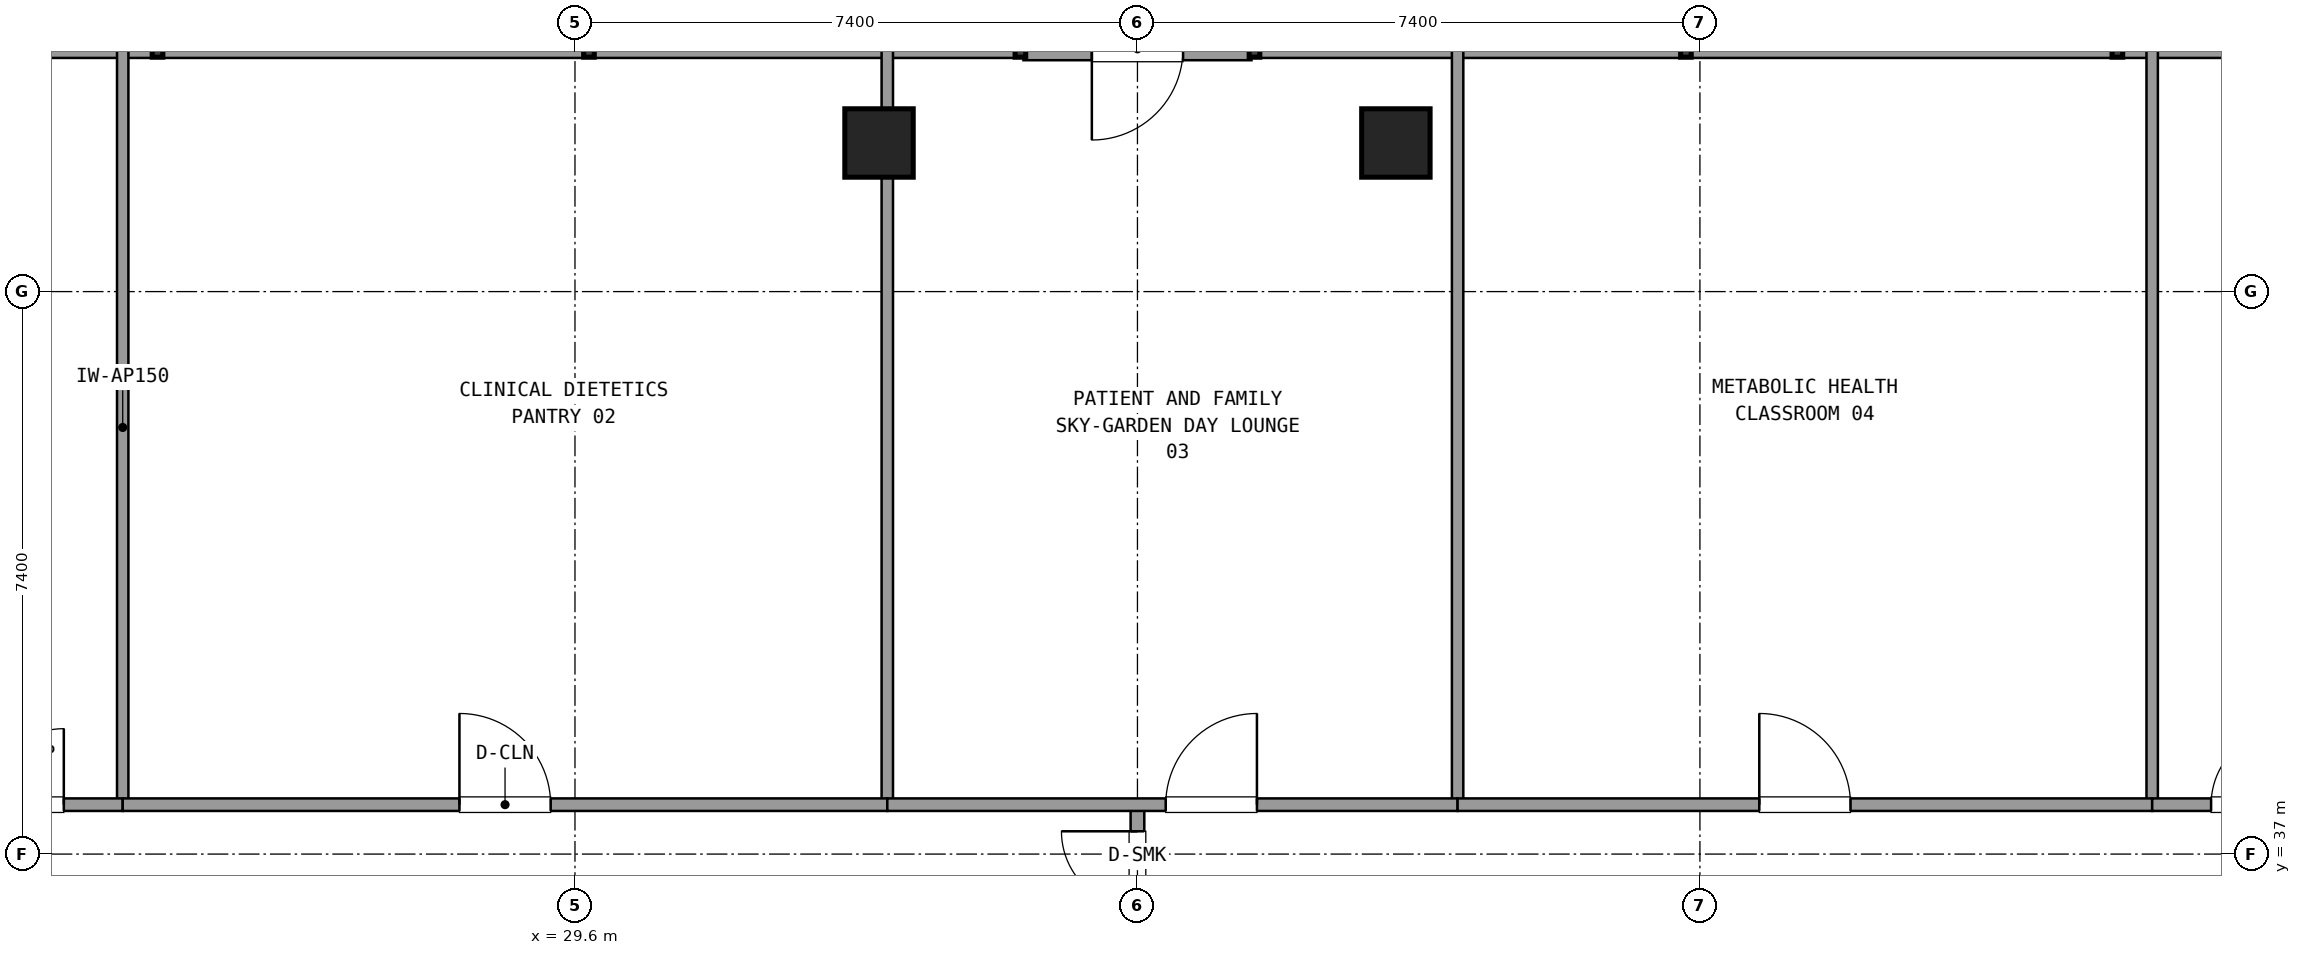
"""IFC4 building model, lengths in metres.
Left out: names, types, materials, properties, quantities, classifications, styles, units other than length and angle.
Written with IfcOpenShell. Run it as: python <this file> out.ifc"""

import sys

from ifc_helpers import new_model, si_unit, direction, frame, frame_2d, origin, origin_2d, place, context, subcontext, project, spatial, rectangle, extrude, element, fill, save


model = new_model("IFC4")
c1 = context("Model", 3, precision=1e-05, world=origin(), true_north=direction((0.0, 1.0)))
c2 = subcontext(c1, "Body", "Model", "MODEL_VIEW")
j1 = project(units=[si_unit("LENGTHUNIT", "METRE"), si_unit("PLANEANGLEUNIT", "RADIAN")], contexts=[c1])
p1 = place(None, origin())
s1 = spatial("IfcSite", under=j1, at=p1, CompositionType="ELEMENT")
p2 = place(p1, origin())
s2 = spatial("IfcBuilding", under=s1, at=p2, CompositionType="ELEMENT")
p3 = place(p2, frame((0.0, 0.0, 192.78)))
s3 = spatial("IfcBuildingStorey", under=s2, at=p3, CompositionType="ELEMENT", Elevation=192.78)
for number, where, z_axis, x_axis in (
    (1, (40.4, 46.355, 0.021), (0.0, 0.032, 0.999), (-1.0, 0.0, 0.0)),
    (2, (33.6, 46.355, 0.021), (0.0, 0.032, 0.999), (-1.0, 0.0, 0.0)),
):
    element("IfcColumn", number, at=place(p3, frame(where, z_axis=z_axis, x_axis=x_axis)), inside=s3, PredefinedType="COLUMN", context=c2, shape_type="SweptSolid", body=[
        extrude(rectangle(XDim=0.9, YDim=0.9, at=origin_2d()), origin(), (0.0, 0.0, 1.0), 3.56),
    ])
p4 = place(p3, frame((38.5, 47.594, 0.0), z_axis=(0.0, 0.0, 1.0), x_axis=(-1.0, 0.0, 0.0)))
e3 = element("IfcWall", 3, at=p4, inside=s3, PredefinedType="SOLIDWALL", context=c2, shape_type="SweptSolid", body=[
    extrude(rectangle(XDim=3.0, YDim=0.3, at=frame_2d((1.5, 0.0))), origin(), (0.0, 0.0, 1.0), 2.69),
])
p5 = place(p4, frame((0.9, 0.0, 0.0)))
e4 = element("IfcOpeningElement", 4, at=p5, cuts=e3, PredefinedType="OPENING", context=c2, shape_type="SweptSolid", body=[
    extrude(rectangle(XDim=1.2, YDim=2.2, at=frame_2d((0.6, 1.1))), frame((0.0, 0.16, 0.0), z_axis=(0.0, -1.0, 0.0), x_axis=(1.0, 0.0, 0.0)), (0.0, 0.0, 1.0), 0.32),
])
for number, where, z_axis, x_axis in (
    (5, (55.568, 47.594, 0.0), (0.0, 0.0, 1.0), (-1.0, 0.0, 0.0)),
    (6, (35.46, 47.594, 0.0), (0.0, 0.0, 1.0), (-1.0, 0.0, 0.0)),
):
    element("IfcWall", number, at=place(p3, frame(where, z_axis=z_axis, x_axis=x_axis)), inside=s3, PredefinedType="SOLIDWALL", context=c2, shape_type="SweptSolid", body=[
        extrude(rectangle(XDim=17.028, YDim=0.24, at=frame_2d((8.514, 0.0))), origin(), (0.0, 0.0, 1.0), 0.85),
    ])
p6 = place(p3, frame((37.0, 34.95, 0.0), z_axis=(0.0, 0.0, 1.0), x_axis=(0.0, 1.0, 0.0)))
e7 = element("IfcWall", 7, at=p6, inside=s3, PredefinedType="PARTITIONING", context=c2, shape_type="SweptSolid", body=[
    extrude(rectangle(XDim=2.7, YDim=0.18, at=frame_2d((1.35, 0.0))), origin(), (0.0, 0.0, 1.0), 2.61),
])
p7 = place(p6, frame((0.35, 0.0, 0.0)))
e8 = element("IfcOpeningElement", 8, at=p7, cuts=e7, PredefinedType="OPENING", context=c2, shape_type="SweptSolid", body=[
    extrude(rectangle(XDim=2.0, YDim=2.2, at=frame_2d((1.0, 1.1))), frame((0.0, 0.1, 0.0), z_axis=(0.0, -1.0, 0.0), x_axis=(1.0, 0.0, 0.0)), (0.0, 0.0, 1.0), 0.2),
])
p8 = place(p3, frame((23.65, 37.65, 0.0), z_axis=(0.0, 0.0, 1.0), x_axis=(0.0, 1.0, 0.0)))
e9 = element("IfcWall", 9, at=p8, inside=s3, PredefinedType="PARTITIONING", context=c2, shape_type="SweptSolid", body=[
    extrude(rectangle(XDim=9.925, YDim=0.15, at=frame_2d((4.962, 0.0))), origin(), (0.0, 0.0, 1.0), 2.61),
])
p9 = place(p3, frame((21.1, 37.65, 0.0), z_axis=(0.0, 0.0, 1.0), x_axis=(1.0, 0.0, 0.0)))
e10 = element("IfcWall", 10, at=p9, inside=s3, PredefinedType="PARTITIONING", context=c2, shape_type="SweptSolid", body=[
    extrude(rectangle(XDim=2.55, YDim=0.165, at=frame_2d((1.275, 0.0))), origin(), (0.0, 0.0, 1.0), 2.61),
])
p10 = place(p9, frame((0.775, 0.0, 0.0)))
e11 = element("IfcOpeningElement", 11, at=p10, cuts=e10, PredefinedType="OPENING", context=c2, shape_type="SweptSolid", body=[
    extrude(rectangle(XDim=1.0, YDim=2.15, at=frame_2d((0.5, 1.075))), frame((0.0, 0.093, 0.0), z_axis=(0.0, -1.0, 0.0), x_axis=(1.0, 0.0, 0.0)), (0.0, 0.0, 1.0), 0.185),
])
p11 = place(p3, frame((33.709, 37.65, 0.0), z_axis=(0.0, 0.0, 1.0), x_axis=(0.0, 1.0, 0.0)))
e12 = element("IfcWall", 12, at=p11, inside=s3, PredefinedType="PARTITIONING", context=c2, shape_type="SweptSolid", body=[
    extrude(rectangle(XDim=9.925, YDim=0.15, at=frame_2d((4.962, 0.0))), origin(), (0.0, 0.0, 1.0), 2.61),
])
p12 = place(p3, frame((23.65, 37.65, 0.0), z_axis=(0.0, 0.0, 1.0), x_axis=(1.0, 0.0, 0.0)))
e13 = element("IfcWall", 13, at=p12, inside=s3, PredefinedType="PARTITIONING", context=c2, shape_type="SweptSolid", body=[
    extrude(rectangle(XDim=10.059, YDim=0.165, at=frame_2d((5.03, 0.0))), origin(), (0.0, 0.0, 1.0), 2.61),
])
p13 = place(p12, frame((4.43, 0.0, 0.0)))
e14 = element("IfcOpeningElement", 14, at=p13, cuts=e13, PredefinedType="OPENING", context=c2, shape_type="SweptSolid", body=[
    extrude(rectangle(XDim=1.2, YDim=2.15, at=frame_2d((0.6, 1.075))), frame((0.0, 0.093, 0.0), z_axis=(0.0, -1.0, 0.0), x_axis=(1.0, 0.0, 0.0)), (0.0, 0.0, 1.0), 0.185),
])
p14 = place(p3, frame((41.212, 37.65, 0.0), z_axis=(0.0, 0.0, 1.0), x_axis=(0.0, 1.0, 0.0)))
e15 = element("IfcWall", 15, at=p14, inside=s3, PredefinedType="PARTITIONING", context=c2, shape_type="SweptSolid", body=[
    extrude(rectangle(XDim=9.925, YDim=0.15, at=frame_2d((4.962, 0.0))), origin(), (0.0, 0.0, 1.0), 2.61),
])
p15 = place(p3, frame((33.709, 37.65, 0.0), z_axis=(0.0, 0.0, 1.0), x_axis=(1.0, 0.0, 0.0)))
e16 = element("IfcWall", 16, at=p15, inside=s3, PredefinedType="PARTITIONING", context=c2, shape_type="SweptSolid", body=[
    extrude(rectangle(XDim=7.503, YDim=0.165, at=frame_2d((3.751, 0.0))), origin(), (0.0, 0.0, 1.0), 2.61),
])
p16 = place(p15, frame((3.663, 0.0, 0.0)))
e17 = element("IfcOpeningElement", 17, at=p16, cuts=e16, PredefinedType="OPENING", context=c2, shape_type="SweptSolid", body=[
    extrude(rectangle(XDim=1.2, YDim=2.15, at=frame_2d((0.6, 1.075))), frame((0.0, 0.093, 0.0), z_axis=(0.0, -1.0, 0.0), x_axis=(1.0, 0.0, 0.0)), (0.0, 0.0, 1.0), 0.185),
])
p17 = place(p3, frame((50.35, 37.65, 0.0), z_axis=(0.0, 0.0, 1.0), x_axis=(0.0, 1.0, 0.0)))
e18 = element("IfcWall", 18, at=p17, inside=s3, PredefinedType="PARTITIONING", context=c2, shape_type="SweptSolid", body=[
    extrude(rectangle(XDim=9.925, YDim=0.15, at=frame_2d((4.962, 0.0))), origin(), (0.0, 0.0, 1.0), 2.61),
])
p18 = place(p3, frame((41.212, 37.65, 0.0), z_axis=(0.0, 0.0, 1.0), x_axis=(1.0, 0.0, 0.0)))
e19 = element("IfcWall", 19, at=p18, inside=s3, PredefinedType="PARTITIONING", context=c2, shape_type="SweptSolid", body=[
    extrude(rectangle(XDim=9.138, YDim=0.165, at=frame_2d((4.569, 0.0))), origin(), (0.0, 0.0, 1.0), 2.61),
])
p19 = place(p18, frame((3.969, 0.0, 0.0)))
e20 = element("IfcOpeningElement", 20, at=p19, cuts=e19, PredefinedType="OPENING", context=c2, shape_type="SweptSolid", body=[
    extrude(rectangle(XDim=1.2, YDim=2.15, at=frame_2d((0.6, 1.075))), frame((0.0, 0.093, 0.0), z_axis=(0.0, -1.0, 0.0), x_axis=(1.0, 0.0, 0.0)), (0.0, 0.0, 1.0), 0.185),
])
p20 = place(p3, frame((50.35, 37.65, 0.0), z_axis=(0.0, 0.0, 1.0), x_axis=(1.0, 0.0, 0.0)))
e21 = element("IfcWall", 21, at=p20, inside=s3, PredefinedType="PARTITIONING", context=c2, shape_type="SweptSolid", body=[
    extrude(rectangle(XDim=2.55, YDim=0.165, at=frame_2d((1.275, 0.0))), origin(), (0.0, 0.0, 1.0), 2.61),
])
p21 = place(p20, frame((0.775, 0.0, 0.0)))
e22 = element("IfcOpeningElement", 22, at=p21, cuts=e21, PredefinedType="OPENING", context=c2, shape_type="SweptSolid", body=[
    extrude(rectangle(XDim=1.0, YDim=2.15, at=frame_2d((0.5, 1.075))), frame((0.0, 0.093, 0.0), z_axis=(0.0, -1.0, 0.0), x_axis=(1.0, 0.0, 0.0)), (0.0, 0.0, 1.0), 0.185),
])
p22 = place(p7, origin())
e23 = element("IfcDoor", 23, at=p22, inside=s3, OperationType="DOUBLE_DOOR_SINGLE_SWING", PredefinedType="DOOR", context=c2, shape_type="SweptSolid", body=[
    extrude(rectangle(XDim=2.0, YDim=2.2, at=frame_2d((1.0, 1.1))), frame((0.0, 0.025, 0.0), z_axis=(0.0, -1.0, 0.0), x_axis=(1.0, 0.0, 0.0)), (0.0, 0.0, 1.0), 0.05),
])
fill(e8, e23)
p23 = place(p10, origin())
e24 = element("IfcDoor", 24, at=p23, inside=s3, OperationType="SINGLE_SWING_RIGHT", PredefinedType="DOOR", context=c2, shape_type="SweptSolid", body=[
    extrude(rectangle(XDim=1.0, YDim=2.15, at=frame_2d((0.5, 1.075))), frame((0.0, 0.025, 0.0), z_axis=(0.0, -1.0, 0.0), x_axis=(1.0, 0.0, 0.0)), (0.0, 0.0, 1.0), 0.05),
])
fill(e11, e24)
p24 = place(p13, origin())
e25 = element("IfcDoor", 25, at=p24, inside=s3, OperationType="SINGLE_SWING_LEFT", PredefinedType="DOOR", context=c2, shape_type="SweptSolid", body=[
    extrude(rectangle(XDim=1.2, YDim=2.15, at=frame_2d((0.6, 1.075))), frame((0.0, 0.025, 0.0), z_axis=(0.0, -1.0, 0.0), x_axis=(1.0, 0.0, 0.0)), (0.0, 0.0, 1.0), 0.05),
])
fill(e14, e25)
p25 = place(p16, origin())
e26 = element("IfcDoor", 26, at=p25, inside=s3, OperationType="SINGLE_SWING_RIGHT", PredefinedType="DOOR", context=c2, shape_type="SweptSolid", body=[
    extrude(rectangle(XDim=1.2, YDim=2.15, at=frame_2d((0.6, 1.075))), frame((0.0, 0.025, 0.0), z_axis=(0.0, -1.0, 0.0), x_axis=(1.0, 0.0, 0.0)), (0.0, 0.0, 1.0), 0.05),
])
fill(e17, e26)
p26 = place(p19, origin())
e27 = element("IfcDoor", 27, at=p26, inside=s3, OperationType="SINGLE_SWING_LEFT", PredefinedType="DOOR", context=c2, shape_type="SweptSolid", body=[
    extrude(rectangle(XDim=1.2, YDim=2.15, at=frame_2d((0.6, 1.075))), frame((0.0, 0.025, 0.0), z_axis=(0.0, -1.0, 0.0), x_axis=(1.0, 0.0, 0.0)), (0.0, 0.0, 1.0), 0.05),
])
fill(e20, e27)
p27 = place(p21, origin())
e28 = element("IfcDoor", 28, at=p27, inside=s3, OperationType="SINGLE_SWING_RIGHT", PredefinedType="DOOR", context=c2, shape_type="SweptSolid", body=[
    extrude(rectangle(XDim=1.0, YDim=2.15, at=frame_2d((0.5, 1.075))), frame((0.0, 0.025, 0.0), z_axis=(0.0, -1.0, 0.0), x_axis=(1.0, 0.0, 0.0)), (0.0, 0.0, 1.0), 0.05),
])
fill(e22, e28)
save(model, sys.argv[1])
